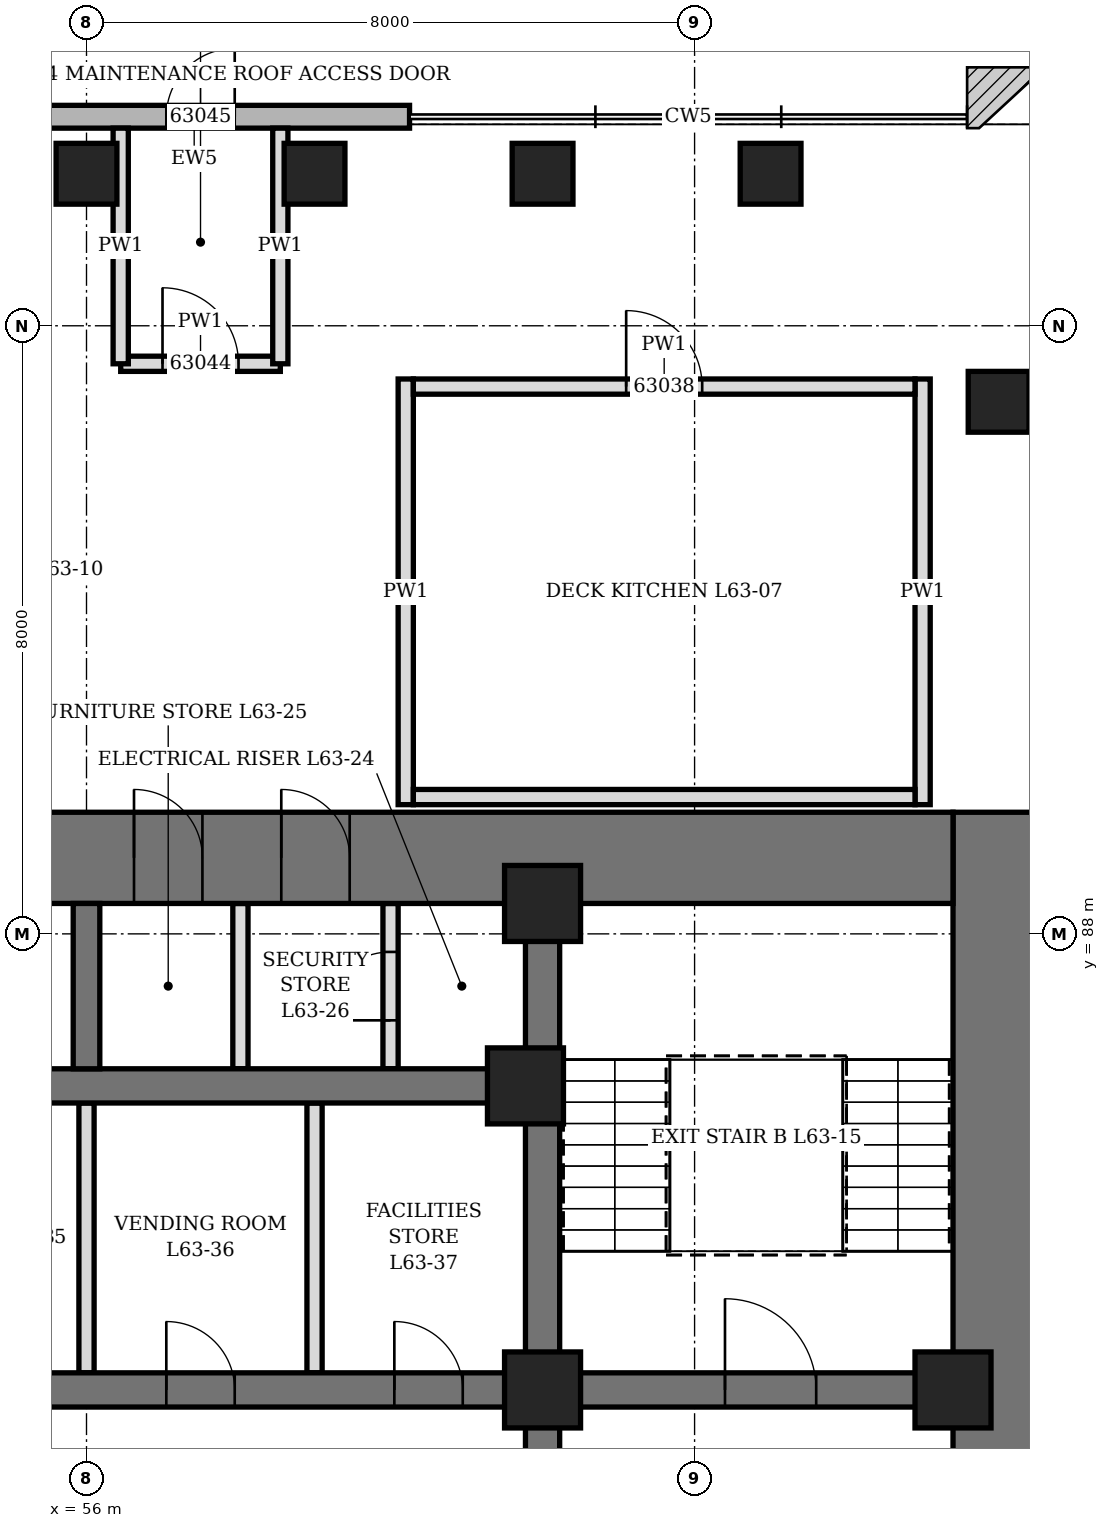
"""IFC4 building model, lengths in metres.
Left out: names, types, materials, properties, quantities, classifications, styles, units other than length and angle.
Written with IfcOpenShell. Run it as: python <this file> out.ifc"""

import sys

from ifc_helpers import new_model, si_unit, direction, frame, frame_2d, origin, origin_2d, place, context, subcontext, project, spatial, rectangle, hollow_rectangle, extrude, clip, halfspace, element, fill, save


model = new_model("IFC4")
c1 = context("Model", 3, precision=1e-05, world=origin(), true_north=direction((0.0, 1.0)))
c2 = subcontext(c1, "Body", "Model", "MODEL_VIEW")
j1 = project(units=[si_unit("LENGTHUNIT", "METRE"), si_unit("PLANEANGLEUNIT", "RADIAN")], contexts=[c1])
p1 = place(None, origin())
s1 = spatial("IfcSite", under=j1, at=p1, CompositionType="ELEMENT")
p2 = place(p1, origin())
s2 = spatial("IfcBuilding", under=s1, at=p2, CompositionType="ELEMENT")
p3 = place(p2, frame((0.0, 0.0, 279.7)))
s3 = spatial("IfcBuildingStorey", under=s2, at=p3, CompositionType="ELEMENT", Elevation=279.7)
p4 = place(p3, frame((71.25, 95.25, -0.25), z_axis=(-0.418919145253, -0.418919145253, 0.805613740871), x_axis=(0.707106781187, -0.707106781187, 0.0)))
e1 = element("IfcColumn", 1, at=p4, inside=s3, PredefinedType="COLUMN", context=c2, shape_type="Clipping", body=[
    clip(clip(extrude(hollow_rectangle(XDim=0.8, YDim=0.8, WallThickness=0.1, at=origin_2d()), origin(), (0.0, 0.0, 1.0), 7.758), halfspace(frame((0.0, 0.0, 0.297), z_axis=(0.0, 0.0, 1.0), x_axis=(1.0, 0.0, 0.0)), True)), halfspace(frame((0.0, 0.0, 7.461), z_axis=(0.0, 0.0, -1.0), x_axis=(1.0, 0.0, 0.0)), True)),
])
p5 = place(p3, frame((68.0, 95.0, -0.25), z_axis=(0.0, 0.0, 1.0), x_axis=(0.0, 1.0, 0.0)))
e2 = element("IfcColumn", 2, at=p5, inside=s3, PredefinedType="COLUMN", context=c2, shape_type="SweptSolid", body=[
    extrude(hollow_rectangle(XDim=0.8, YDim=0.8, WallThickness=0.1, at=origin_2d()), origin(), (0.0, 0.0, 1.0), 6.25),
])
p6 = place(p3, frame((71.25, 101.0, -0.25), z_axis=(-0.424465046491, -0.391813889069, 0.81627893556), x_axis=(0.678280102733, -0.734803444627, 0.0)))
e3 = element("IfcColumn", 3, at=p6, inside=s3, PredefinedType="COLUMN", context=c2, shape_type="Clipping", body=[
    clip(clip(extrude(hollow_rectangle(XDim=0.8, YDim=0.8, WallThickness=0.1, at=origin_2d()), origin(), (0.0, 0.0, 1.0), 7.657), halfspace(frame((0.0, 0.0, 0.285), z_axis=(0.0, 0.0, 1.0), x_axis=(1.0, 0.0, 0.0)), True)), halfspace(frame((0.0, 0.0, 7.371), z_axis=(0.0, 0.0, -1.0), x_axis=(1.0, 0.0, 0.0)), True)),
])
for number, where, z_axis, x_axis in (
    (4, (65.0, 98.0, -0.25), (0.0, 0.0, 1.0), (1.0, 0.0, 0.0)),
    (5, (62.0, 98.0, -0.25), (0.0, 0.0, 1.0), (1.0, 0.0, 0.0)),
    (6, (59.0, 98.0, -0.25), (0.0, 0.0, 1.0), (1.0, 0.0, 0.0)),
    (7, (56.0, 98.0, -0.25), (0.0, 0.0, 1.0), (1.0, 0.0, 0.0)),
):
    element("IfcColumn", number, at=place(p3, frame(where, z_axis=z_axis, x_axis=x_axis)), inside=s3, PredefinedType="COLUMN", context=c2, shape_type="SweptSolid", body=[
        extrude(hollow_rectangle(XDim=0.8, YDim=0.8, WallThickness=0.1, at=origin_2d()), origin(), (0.0, 0.0, 1.0), 6.25),
    ])
p7 = place(p3, frame((68.0, 70.4, 0.0), z_axis=(0.0, 0.0, 1.0), x_axis=(0.0, 1.0, 0.0)))
e8 = element("IfcWall", 8, at=p7, inside=s3, PredefinedType="SHEAR", context=c2, shape_type="SweptSolid", body=[
    extrude(rectangle(XDim=19.2, YDim=1.2, at=frame_2d((9.6, 0.0))), origin(), (0.0, 0.0, 1.0), 6.0),
])
p8 = place(p7, frame((8.6, 0.0, 0.0)))
e9 = element("IfcOpeningElement", 9, at=p8, cuts=e8, PredefinedType="OPENING", context=c2, shape_type="SweptSolid", body=[
    extrude(rectangle(XDim=2.0, YDim=2.4, at=frame_2d((1.0, 1.2))), frame((0.0, 0.61, 0.0), z_axis=(0.0, -1.0, 0.0), x_axis=(1.0, 0.0, 0.0)), (0.0, 0.0, 1.0), 1.22),
])
p9 = place(p3, frame((44.6, 89.0, 0.0), z_axis=(0.0, 0.0, 1.0), x_axis=(1.0, 0.0, 0.0)))
e10 = element("IfcWall", 10, at=p9, inside=s3, PredefinedType="SHEAR", context=c2, shape_type="SweptSolid", body=[
    extrude(rectangle(XDim=22.8, YDim=1.2, at=frame_2d((11.4, 0.0))), origin(), (0.0, 0.0, 1.0), 6.0),
])
p10 = place(p9, frame((7.9, 0.0, 0.0)))
e11 = element("IfcOpeningElement", 11, at=p10, cuts=e10, PredefinedType="OPENING", context=c2, shape_type="SweptSolid", body=[
    extrude(rectangle(XDim=1.0, YDim=2.1, at=frame_2d((0.5, 1.05))), frame((0.0, 0.61, 0.0), z_axis=(0.0, -1.0, 0.0), x_axis=(1.0, 0.0, 0.0)), (0.0, 0.0, 1.0), 1.22),
])
p11 = place(p9, frame((12.025, 0.0, 0.0)))
e12 = element("IfcOpeningElement", 12, at=p11, cuts=e10, PredefinedType="OPENING", context=c2, shape_type="SweptSolid", body=[
    extrude(rectangle(XDim=0.9, YDim=2.1, at=frame_2d((0.45, 1.05))), frame((0.0, 0.61, 0.0), z_axis=(0.0, -1.0, 0.0), x_axis=(1.0, 0.0, 0.0)), (0.0, 0.0, 1.0), 1.22),
])
p12 = place(p9, frame((13.962, 0.0, 0.0)))
e13 = element("IfcOpeningElement", 13, at=p12, cuts=e10, PredefinedType="OPENING", context=c2, shape_type="SweptSolid", body=[
    extrude(rectangle(XDim=0.9, YDim=2.1, at=frame_2d((0.45, 1.05))), frame((0.0, 0.61, 0.0), z_axis=(0.0, -1.0, 0.0), x_axis=(1.0, 0.0, 0.0)), (0.0, 0.0, 1.0), 1.22),
])
p13 = place(p3, frame((62.0, 71.6, 0.0), z_axis=(0.0, 0.0, 1.0), x_axis=(0.0, 1.0, 0.0)))
e14 = element("IfcWall", 14, at=p13, inside=s3, PredefinedType="SHEAR", context=c2, shape_type="SweptSolid", body=[
    extrude(rectangle(XDim=16.8, YDim=0.45, at=frame_2d((8.4, 0.0))), origin(), (0.0, 0.0, 1.0), 6.0),
])
p14 = place(p13, frame((7.5, 0.0, 0.0)))
e15 = element("IfcOpeningElement", 15, at=p14, cuts=e14, PredefinedType="OPENING", context=c2, shape_type="SweptSolid", body=[
    extrude(rectangle(XDim=1.8, YDim=2.4, at=frame_2d((0.9, 1.2))), frame((0.0, 0.235, 0.0), z_axis=(0.0, -1.0, 0.0), x_axis=(1.0, 0.0, 0.0)), (0.0, 0.0, 1.0), 0.47),
])
p15 = place(p3, frame((62.225, 82.0, 0.0), z_axis=(0.0, 0.0, 1.0), x_axis=(1.0, 0.0, 0.0)))
e16 = element("IfcWall", 16, at=p15, inside=s3, PredefinedType="SHEAR", context=c2, shape_type="SweptSolid", body=[
    extrude(rectangle(XDim=5.175, YDim=0.45, at=frame_2d((2.587, 0.0))), origin(), (0.0, 0.0, 1.0), 6.0),
])
p16 = place(p15, frame((2.175, 0.0, 0.0)))
e17 = element("IfcOpeningElement", 17, at=p16, cuts=e16, PredefinedType="OPENING", context=c2, shape_type="SweptSolid", body=[
    extrude(rectangle(XDim=1.2, YDim=2.1, at=frame_2d((0.6, 1.05))), frame((0.0, 0.235, 0.0), z_axis=(0.0, -1.0, 0.0), x_axis=(1.0, 0.0, 0.0)), (0.0, 0.0, 1.0), 0.47),
])
p17 = place(p3, frame((50.225, 82.0, 0.0), z_axis=(0.0, 0.0, 1.0), x_axis=(1.0, 0.0, 0.0)))
e18 = element("IfcWall", 18, at=p17, inside=s3, PredefinedType="SHEAR", context=c2, shape_type="SweptSolid", body=[
    extrude(rectangle(XDim=11.55, YDim=0.45, at=frame_2d((5.775, 0.0))), origin(), (0.0, 0.0, 1.0), 6.0),
])
p18 = place(p17, frame((0.825, 0.0, 0.0)))
e19 = element("IfcOpeningElement", 19, at=p18, cuts=e18, PredefinedType="OPENING", context=c2, shape_type="SweptSolid", body=[
    extrude(rectangle(XDim=0.9, YDim=2.1, at=frame_2d((0.45, 1.05))), frame((0.0, 0.235, 0.0), z_axis=(0.0, -1.0, 0.0), x_axis=(1.0, 0.0, 0.0)), (0.0, 0.0, 1.0), 0.47),
])
p19 = place(p17, frame((3.825, 0.0, 0.0)))
e20 = element("IfcOpeningElement", 20, at=p19, cuts=e18, PredefinedType="OPENING", context=c2, shape_type="SweptSolid", body=[
    extrude(rectangle(XDim=0.9, YDim=2.1, at=frame_2d((0.45, 1.05))), frame((0.0, 0.235, 0.0), z_axis=(0.0, -1.0, 0.0), x_axis=(1.0, 0.0, 0.0)), (0.0, 0.0, 1.0), 0.47),
])
p20 = place(p17, frame((6.825, 0.0, 0.0)))
e21 = element("IfcOpeningElement", 21, at=p20, cuts=e18, PredefinedType="OPENING", context=c2, shape_type="SweptSolid", body=[
    extrude(rectangle(XDim=0.9, YDim=2.1, at=frame_2d((0.45, 1.05))), frame((0.0, 0.235, 0.0), z_axis=(0.0, -1.0, 0.0), x_axis=(1.0, 0.0, 0.0)), (0.0, 0.0, 1.0), 0.47),
])
p21 = place(p17, frame((9.825, 0.0, 0.0)))
e22 = element("IfcOpeningElement", 22, at=p21, cuts=e18, PredefinedType="OPENING", context=c2, shape_type="SweptSolid", body=[
    extrude(rectangle(XDim=0.9, YDim=2.1, at=frame_2d((0.45, 1.05))), frame((0.0, 0.235, 0.0), z_axis=(0.0, -1.0, 0.0), x_axis=(1.0, 0.0, 0.0)), (0.0, 0.0, 1.0), 0.47),
])
p22 = place(p3, frame((50.225, 86.0, 0.0), z_axis=(0.0, 0.0, 1.0), x_axis=(1.0, 0.0, 0.0)))
e23 = element("IfcWall", 23, at=p22, inside=s3, PredefinedType="SHEAR", context=c2, shape_type="SweptSolid", body=[
    extrude(rectangle(XDim=11.55, YDim=0.45, at=frame_2d((5.775, 0.0))), origin(), (0.0, 0.0, 1.0), 6.0),
])
p23 = place(p3, frame((56.0, 86.225, 0.0), z_axis=(0.0, 0.0, 1.0), x_axis=(0.0, 1.0, 0.0)))
e24 = element("IfcWall", 24, at=p23, inside=s3, PredefinedType="SHEAR", context=c2, shape_type="SweptSolid", body=[
    extrude(rectangle(XDim=2.175, YDim=0.35, at=frame_2d((1.087, 0.0))), origin(), (0.0, 0.0, 1.0), 6.0),
])
for number, where, z_axis, x_axis in (
    (25, (61.775, 86.0, 0.0), (0.0, 0.0, 1.0), (1.0, 0.0, 0.0)),
    (26, (62.0, 82.0, 0.0), (0.0, 0.0, 1.0), (1.0, 0.0, 0.0)),
    (27, (62.0, 88.4, 0.0), (0.0, 0.0, 1.0), (1.0, 0.0, 0.0)),
    (28, (67.4, 82.0, 0.0), (0.0, 0.0, 1.0), (1.0, 0.0, 0.0)),
):
    element("IfcColumn", number, at=place(p3, frame(where, z_axis=z_axis, x_axis=x_axis)), inside=s3, PredefinedType="COLUMN", context=c2, shape_type="SweptSolid", body=[
        extrude(hollow_rectangle(XDim=1.0, YDim=1.0, WallThickness=0.15, at=origin_2d()), origin(), (0.0, 0.0, 1.0), 6.0),
    ])
p24 = place(p3, frame((60.25, 98.75, 0.0), z_axis=(0.0, 0.0, 1.0), x_axis=(-1.0, 0.0, 0.0)))
e29 = element("IfcWall", 29, at=p24, inside=s3, PredefinedType="SOLIDWALL", context=c2, shape_type="SweptSolid", body=[
    extrude(rectangle(XDim=5.667, YDim=0.3, at=frame_2d((2.833, 0.0))), origin(), (0.0, 0.0, 1.0), 5.75),
])
p25 = place(p24, frame((2.3, 0.0, 0.0)))
e30 = element("IfcOpeningElement", 30, at=p25, cuts=e29, PredefinedType="OPENING", context=c2, shape_type="SweptSolid", body=[
    extrude(rectangle(XDim=0.9, YDim=2.1, at=frame_2d((0.45, 1.05))), frame((0.0, 0.16, 0.0), z_axis=(0.0, -1.0, 0.0), x_axis=(1.0, 0.0, 0.0)), (0.0, 0.0, 1.0), 0.32),
])
p26 = place(p3, frame((60.0, 86.225, 0.0), z_axis=(0.0, 0.0, 1.0), x_axis=(0.0, 1.0, 0.0)))
e31 = element("IfcWall", 31, at=p26, inside=s3, PredefinedType="PARTITIONING", context=c2, shape_type="SweptSolid", body=[
    extrude(rectangle(XDim=2.175, YDim=0.2, at=frame_2d((1.087, 0.0))), origin(), (0.0, 0.0, 1.0), 5.75),
])
p27 = place(p26, frame((0.637, 0.0, 0.0)))
e32 = element("IfcOpeningElement", 32, at=p27, cuts=e31, PredefinedType="OPENING", context=c2, shape_type="SweptSolid", body=[
    extrude(rectangle(XDim=0.9, YDim=2.1, at=frame_2d((0.45, 1.05))), frame((0.0, 0.11, 0.0), z_axis=(0.0, -1.0, 0.0), x_axis=(1.0, 0.0, 0.0)), (0.0, 0.0, 1.0), 0.22),
])
p28 = place(p3, frame((58.025, 86.225, 0.0), z_axis=(0.0, 0.0, 1.0), x_axis=(0.0, 1.0, 0.0)))
e33 = element("IfcWall", 33, at=p28, inside=s3, PredefinedType="PARTITIONING", context=c2, shape_type="SweptSolid", body=[
    extrude(rectangle(XDim=2.175, YDim=0.2, at=frame_2d((1.087, 0.0))), origin(), (0.0, 0.0, 1.0), 5.75),
])
p29 = place(p3, frame((56.0, 82.225, 0.0), z_axis=(0.0, 0.0, 1.0), x_axis=(0.0, 1.0, 0.0)))
e34 = element("IfcWall", 34, at=p29, inside=s3, PredefinedType="PARTITIONING", context=c2, shape_type="SweptSolid", body=[
    extrude(rectangle(XDim=3.55, YDim=0.2, at=frame_2d((1.775, 0.0))), origin(), (0.0, 0.0, 1.0), 4.25),
])
p30 = place(p3, frame((59.0, 82.225, 0.0), z_axis=(0.0, 0.0, 1.0), x_axis=(0.0, 1.0, 0.0)))
e35 = element("IfcWall", 35, at=p30, inside=s3, PredefinedType="PARTITIONING", context=c2, shape_type="SweptSolid", body=[
    extrude(rectangle(XDim=3.55, YDim=0.2, at=frame_2d((1.775, 0.0))), origin(), (0.0, 0.0, 1.0), 5.75),
])
for number, where, z_axis, x_axis in (
    (36, (60.2, 89.7, 0.0), (0.0, 0.0, 1.0), (0.0, 1.0, 0.0)),
    (37, (67.0, 89.7, 0.0), (0.0, 0.0, 1.0), (0.0, 1.0, 0.0)),
):
    element("IfcWall", number, at=place(p3, frame(where, z_axis=z_axis, x_axis=x_axis)), inside=s3, PredefinedType="PARTITIONING", context=c2, shape_type="SweptSolid", body=[
        extrude(rectangle(XDim=5.6, YDim=0.2, at=frame_2d((2.8, 0.0))), origin(), (0.0, 0.0, 1.0), 5.75),
    ])
p31 = place(p3, frame((60.3, 89.8, 0.0), z_axis=(0.0, 0.0, 1.0), x_axis=(1.0, 0.0, 0.0)))
e38 = element("IfcWall", 38, at=p31, inside=s3, PredefinedType="PARTITIONING", context=c2, shape_type="SweptSolid", body=[
    extrude(rectangle(XDim=6.6, YDim=0.2, at=frame_2d((3.3, 0.0))), origin(), (0.0, 0.0, 1.0), 5.75),
])
p32 = place(p3, frame((60.3, 95.2, 0.0), z_axis=(0.0, 0.0, 1.0), x_axis=(1.0, 0.0, 0.0)))
e39 = element("IfcWall", 39, at=p32, inside=s3, PredefinedType="PARTITIONING", context=c2, shape_type="SweptSolid", body=[
    extrude(rectangle(XDim=6.6, YDim=0.2, at=frame_2d((3.3, 0.0))), origin(), (0.0, 0.0, 1.0), 5.75),
])
p33 = place(p32, frame((2.8, 0.0, 0.0)))
e40 = element("IfcOpeningElement", 40, at=p33, cuts=e39, PredefinedType="OPENING", context=c2, shape_type="SweptSolid", body=[
    extrude(rectangle(XDim=1.0, YDim=2.1, at=frame_2d((0.5, 1.05))), frame((0.0, 0.11, 0.0), z_axis=(0.0, -1.0, 0.0), x_axis=(1.0, 0.0, 0.0)), (0.0, 0.0, 1.0), 0.22),
])
p34 = place(p3, frame((56.45, 95.5, 0.0), z_axis=(0.0, 0.0, 1.0), x_axis=(1.0, 0.0, 0.0)))
e41 = element("IfcWall", 41, at=p34, inside=s3, PredefinedType="PARTITIONING", context=c2, shape_type="SweptSolid", body=[
    extrude(rectangle(XDim=2.1, YDim=0.2, at=frame_2d((1.05, 0.0))), origin(), (0.0, 0.0, 1.0), 5.75),
])
p35 = place(p34, frame((0.55, 0.0, 0.0)))
e42 = element("IfcOpeningElement", 42, at=p35, cuts=e41, PredefinedType="OPENING", context=c2, shape_type="SweptSolid", body=[
    extrude(rectangle(XDim=1.0, YDim=2.1, at=frame_2d((0.5, 1.05))), frame((0.0, 0.11, 0.0), z_axis=(0.0, -1.0, 0.0), x_axis=(1.0, 0.0, 0.0)), (0.0, 0.0, 1.0), 0.22),
])
for number, where, z_axis, x_axis in (
    (43, (56.45, 98.6, 0.0), (0.0, 0.0, 1.0), (0.0, -1.0, 0.0)),
    (44, (58.55, 98.6, 0.0), (0.0, 0.0, 1.0), (0.0, -1.0, 0.0)),
):
    element("IfcWall", number, at=place(p3, frame(where, z_axis=z_axis, x_axis=x_axis)), inside=s3, PredefinedType="PARTITIONING", context=c2, shape_type="SweptSolid", body=[
        extrude(rectangle(XDim=3.1, YDim=0.2, at=frame_2d((1.55, 0.0))), origin(), (0.0, 0.0, 1.0), 5.75),
    ])
p36 = place(p11, origin())
e45 = element("IfcDoor", 45, at=p36, inside=s3, OperationType="SINGLE_SWING_LEFT", PredefinedType="DOOR", context=c2, shape_type="SweptSolid", body=[
    extrude(rectangle(XDim=0.9, YDim=2.1, at=frame_2d((0.45, 1.05))), frame((0.0, 0.35, 0.0), z_axis=(0.0, -1.0, 0.0), x_axis=(1.0, 0.0, 0.0)), (0.0, 0.0, 1.0), 0.7),
])
fill(e12, e45)
p37 = place(p12, origin())
e46 = element("IfcDoor", 46, at=p37, inside=s3, OperationType="SINGLE_SWING_LEFT", PredefinedType="DOOR", context=c2, shape_type="SweptSolid", body=[
    extrude(rectangle(XDim=0.9, YDim=2.1, at=frame_2d((0.45, 1.05))), frame((0.0, 0.35, 0.0), z_axis=(0.0, -1.0, 0.0), x_axis=(1.0, 0.0, 0.0)), (0.0, 0.0, 1.0), 0.7),
])
fill(e13, e46)
p38 = place(p27, origin())
e47 = element("IfcDoor", 47, at=p38, inside=s3, OperationType="SINGLE_SWING_LEFT", PredefinedType="DOOR", context=c2, shape_type="SweptSolid", body=[
    extrude(rectangle(XDim=0.9, YDim=2.1, at=frame_2d((0.45, 1.05))), frame((0.0, 0.1, 0.0), z_axis=(0.0, -1.0, 0.0), x_axis=(1.0, 0.0, 0.0)), (0.0, 0.0, 1.0), 0.199),
])
fill(e32, e47)
p39 = place(p20, origin())
e48 = element("IfcDoor", 48, at=p39, inside=s3, OperationType="SINGLE_SWING_LEFT", PredefinedType="DOOR", context=c2, shape_type="SweptSolid", body=[
    extrude(rectangle(XDim=0.9, YDim=2.1, at=frame_2d((0.45, 1.05))), frame((0.0, 0.225, 0.0), z_axis=(0.0, -1.0, 0.0), x_axis=(1.0, 0.0, 0.0)), (0.0, 0.0, 1.0), 0.449),
])
fill(e21, e48)
p40 = place(p21, origin())
e49 = element("IfcDoor", 49, at=p40, inside=s3, OperationType="SINGLE_SWING_LEFT", PredefinedType="DOOR", context=c2, shape_type="SweptSolid", body=[
    extrude(rectangle(XDim=0.9, YDim=2.1, at=frame_2d((0.45, 1.05))), frame((0.0, 0.225, 0.0), z_axis=(0.0, -1.0, 0.0), x_axis=(1.0, 0.0, 0.0)), (0.0, 0.0, 1.0), 0.449),
])
fill(e22, e49)
p41 = place(p16, origin())
e50 = element("IfcDoor", 50, at=p41, inside=s3, OperationType="SINGLE_SWING_LEFT", PredefinedType="DOOR", context=c2, shape_type="SweptSolid", body=[
    extrude(rectangle(XDim=1.2, YDim=2.1, at=frame_2d((0.6, 1.05))), frame((0.0, 0.225, 0.0), z_axis=(0.0, -1.0, 0.0), x_axis=(1.0, 0.0, 0.0)), (0.0, 0.0, 1.0), 0.449),
])
fill(e17, e50)
p42 = place(p33, origin())
e51 = element("IfcDoor", 51, at=p42, inside=s3, OperationType="SINGLE_SWING_LEFT", PredefinedType="DOOR", context=c2, shape_type="SweptSolid", body=[
    extrude(rectangle(XDim=1.0, YDim=2.1, at=frame_2d((0.5, 1.05))), frame((0.0, 0.1, 0.0), z_axis=(0.0, -1.0, 0.0), x_axis=(1.0, 0.0, 0.0)), (0.0, 0.0, 1.0), 0.199),
])
fill(e40, e51)
p43 = place(p35, origin())
e52 = element("IfcDoor", 52, at=p43, inside=s3, OperationType="SINGLE_SWING_LEFT", PredefinedType="DOOR", context=c2, shape_type="SweptSolid", body=[
    extrude(rectangle(XDim=1.0, YDim=2.1, at=frame_2d((0.5, 1.05))), frame((0.0, 0.1, 0.0), z_axis=(0.0, -1.0, 0.0), x_axis=(1.0, 0.0, 0.0)), (0.0, 0.0, 1.0), 0.199),
])
fill(e42, e52)
p44 = place(p25, frame((0.9, 0.0, 0.0), z_axis=(0.0, 0.0, 1.0), x_axis=(-1.0, 0.0, 0.0)))
e53 = element("IfcDoor", 53, at=p44, inside=s3, OperationType="SINGLE_SWING_RIGHT", PredefinedType="DOOR", context=c2, shape_type="SweptSolid", body=[
    extrude(rectangle(XDim=0.9, YDim=2.1, at=frame_2d((0.45, 1.05))), frame((0.0, 0.15, 0.0), z_axis=(0.0, -1.0, 0.0), x_axis=(1.0, 0.0, 0.0)), (0.0, 0.0, 1.0), 0.3),
])
fill(e30, e53)
save(model, sys.argv[1])
